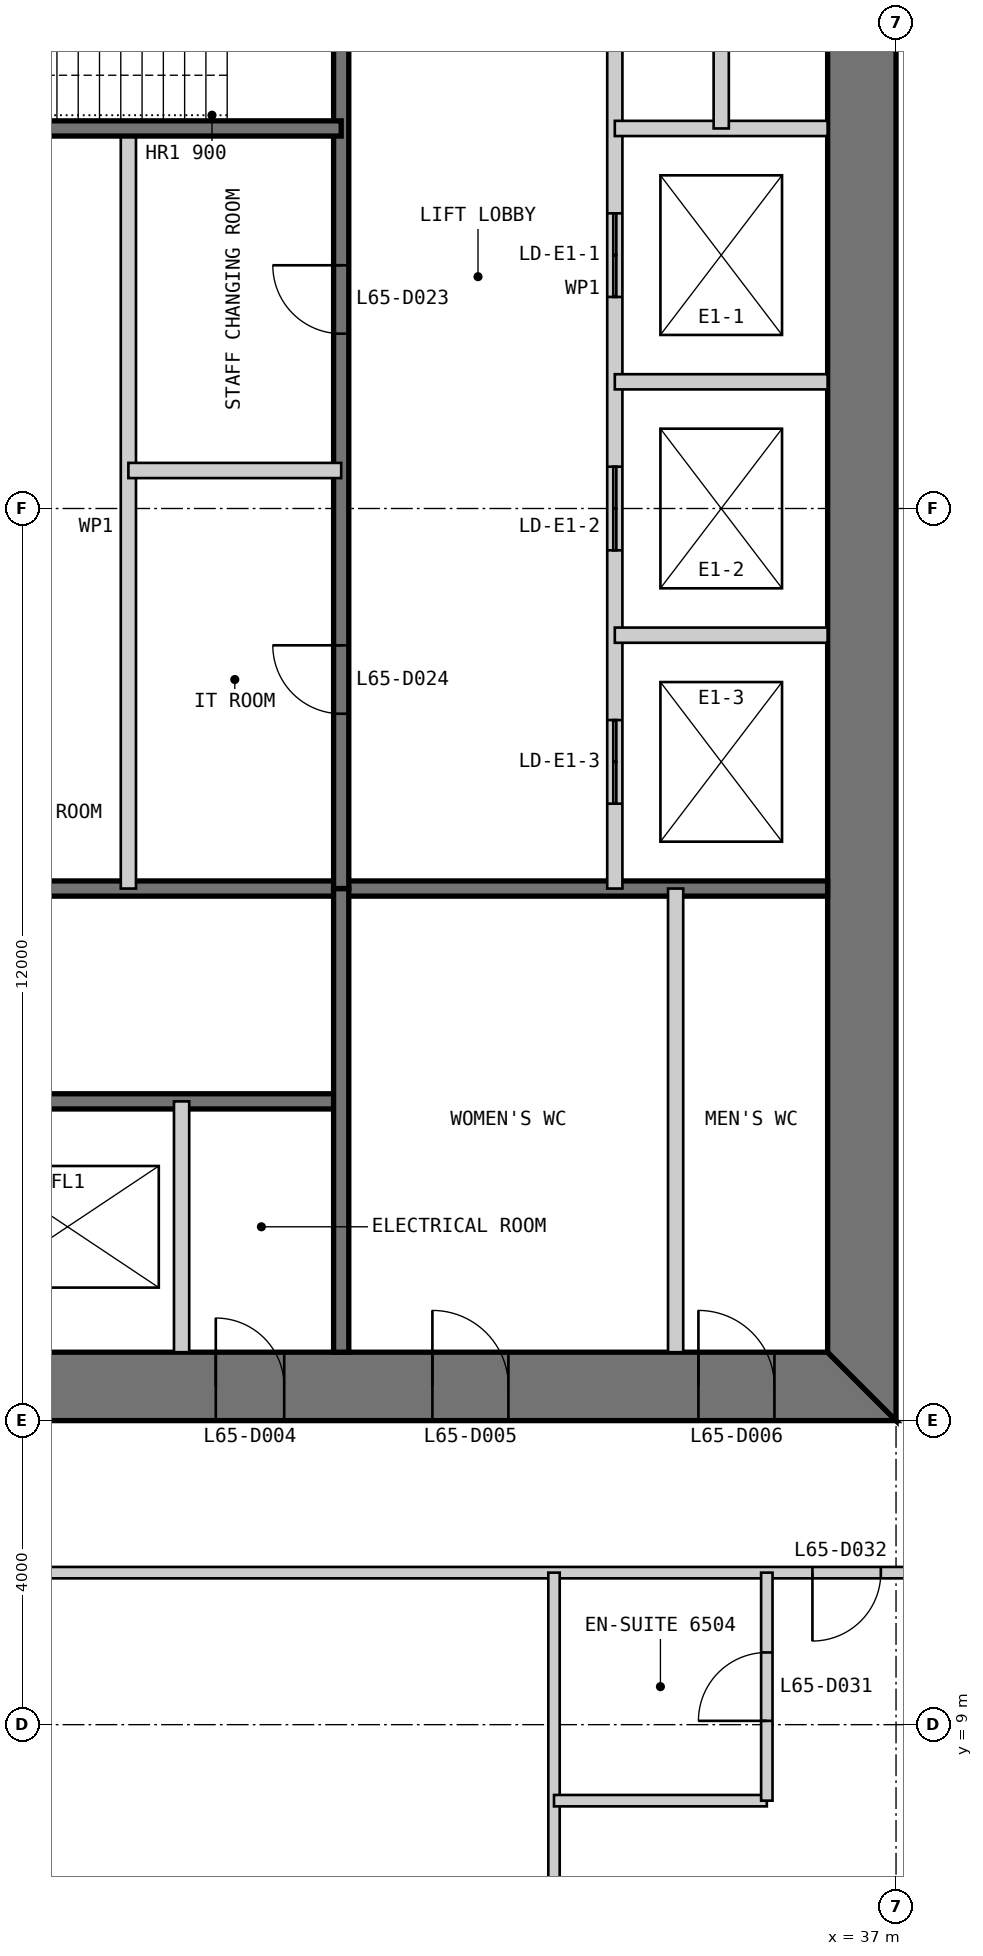
"""IFC4 building model, lengths in metres.
Left out: names, types, materials, properties, quantities, classifications, styles, units other than length and angle.
Written with IfcOpenShell. Run it as: python <this file> out.ifc"""

import sys

from ifc_helpers import new_model, si_unit, direction, frame, frame_2d, origin, place, context, subcontext, project, spatial, polyline, rectangle, outline, extrude, element, fill, save


model = new_model("IFC4")
c1 = context("Model", 3, precision=1e-05, world=origin(), true_north=direction((0.0, 1.0)))
c2 = subcontext(c1, "Body", "Model", "MODEL_VIEW")
j1 = project(units=[si_unit("LENGTHUNIT", "METRE"), si_unit("PLANEANGLEUNIT", "RADIAN")], contexts=[c1])
p1 = place(None, origin())
s1 = spatial("IfcSite", under=j1, at=p1, CompositionType="ELEMENT")
p2 = place(p1, origin())
s2 = spatial("IfcBuilding", under=s1, at=p2, CompositionType="ELEMENT")
p3 = place(p2, frame((0.0, 0.0, 273.0)))
s3 = spatial("IfcBuildingStorey", under=s2, at=p3, CompositionType="ELEMENT", Elevation=273.0)
p4 = place(p3, frame((13.0, 13.45, 0.0), z_axis=(0.0, 0.0, 1.0), x_axis=(1.0, 0.0, 0.0)))
e1 = element("IfcWall", 1, at=p4, inside=s3, PredefinedType="SHEAR", context=c2, shape_type="SweptSolid", body=[
    extrude(outline(polyline([(0.0, -0.45), (24.0, -0.45), (23.1, 0.45), (0.9, 0.45), (0.0, -0.45)])), origin(), (0.0, 0.0, 1.0), 3.4),
])
p5 = place(p4, frame((4.9, 0.0, 0.0)))
e2 = element("IfcOpeningElement", 2, at=p5, cuts=e1, PredefinedType="OPENING", context=c2, shape_type="SweptSolid", body=[
    extrude(rectangle(XDim=1.0, YDim=2.2, at=frame_2d((0.5, 1.1))), frame((0.0, 0.46, 0.0), z_axis=(0.0, -1.0, 0.0), x_axis=(1.0, 0.0, 0.0)), (0.0, 0.0, 1.0), 0.92),
])
p6 = place(p4, frame((8.9, 0.0, 0.0)))
e3 = element("IfcOpeningElement", 3, at=p6, cuts=e1, PredefinedType="OPENING", context=c2, shape_type="SweptSolid", body=[
    extrude(rectangle(XDim=1.1, YDim=2.2, at=frame_2d((0.55, 1.1))), frame((0.0, 0.46, 0.0), z_axis=(0.0, -1.0, 0.0), x_axis=(1.0, 0.0, 0.0)), (0.0, 0.0, 1.0), 0.92),
])
p7 = place(p4, frame((15.05, 0.0, 0.0)))
e4 = element("IfcOpeningElement", 4, at=p7, cuts=e1, PredefinedType="OPENING", context=c2, shape_type="SweptSolid", body=[
    extrude(rectangle(XDim=0.9, YDim=2.2, at=frame_2d((0.45, 1.1))), frame((0.0, 0.46, 0.0), z_axis=(0.0, -1.0, 0.0), x_axis=(1.0, 0.0, 0.0)), (0.0, 0.0, 1.0), 0.92),
])
p8 = place(p4, frame((17.9, 0.0, 0.0)))
e5 = element("IfcOpeningElement", 5, at=p8, cuts=e1, PredefinedType="OPENING", context=c2, shape_type="SweptSolid", body=[
    extrude(rectangle(XDim=1.0, YDim=2.2, at=frame_2d((0.5, 1.1))), frame((0.0, 0.46, 0.0), z_axis=(0.0, -1.0, 0.0), x_axis=(1.0, 0.0, 0.0)), (0.0, 0.0, 1.0), 0.92),
])
p9 = place(p4, frame((21.4, 0.0, 0.0)))
e6 = element("IfcOpeningElement", 6, at=p9, cuts=e1, PredefinedType="OPENING", context=c2, shape_type="SweptSolid", body=[
    extrude(rectangle(XDim=1.0, YDim=2.2, at=frame_2d((0.5, 1.1))), frame((0.0, 0.46, 0.0), z_axis=(0.0, -1.0, 0.0), x_axis=(1.0, 0.0, 0.0)), (0.0, 0.0, 1.0), 0.92),
])
p10 = place(p3, frame((36.55, 13.9, 0.0), z_axis=(0.0, 0.0, 1.0), x_axis=(0.0, 1.0, 0.0)))
e7 = element("IfcWall", 7, at=p10, inside=s3, PredefinedType="SHEAR", context=c2, shape_type="SweptSolid", body=[
    extrude(outline(polyline([(-0.9, -0.45), (23.1, -0.45), (22.2, 0.45), (0.0, 0.45), (-0.9, -0.45)])), origin(), (0.0, 0.0, 1.0), 3.4),
])
p11 = place(p10, frame((20.2, 0.0, 0.0)))
e8 = element("IfcOpeningElement", 8, at=p11, cuts=e7, PredefinedType="OPENING", context=c2, shape_type="SweptSolid", body=[
    extrude(rectangle(XDim=1.0, YDim=2.2, at=frame_2d((0.5, 1.1))), frame((0.0, 0.46, 0.0), z_axis=(0.0, -1.0, 0.0), x_axis=(1.0, 0.0, 0.0)), (0.0, 0.0, 1.0), 0.92),
])
p12 = place(p10, frame((17.25, 0.0, 0.0)))
e9 = element("IfcOpeningElement", 9, at=p12, cuts=e7, PredefinedType="OPENING", context=c2, shape_type="SweptSolid", body=[
    extrude(rectangle(XDim=0.9, YDim=2.2, at=frame_2d((0.45, 1.1))), frame((0.0, 0.46, 0.0), z_axis=(0.0, -1.0, 0.0), x_axis=(1.0, 0.0, 0.0)), (0.0, 0.0, 1.0), 0.92),
])
p13 = place(p3, frame((20.3, 17.2, 0.0), z_axis=(0.0, 0.0, 1.0), x_axis=(1.0, 0.0, 0.0)))
e10 = element("IfcWall", 10, at=p13, inside=s3, PredefinedType="SOLIDWALL", context=c2, shape_type="SweptSolid", body=[
    extrude(rectangle(XDim=9.4, YDim=0.2, at=frame_2d((4.7, 0.0))), origin(), (0.0, 0.0, 1.0), 3.2),
])
p14 = place(p13, frame((0.25, 0.0, 0.0)))
e11 = element("IfcOpeningElement", 11, at=p14, cuts=e10, PredefinedType="OPENING", context=c2, shape_type="SweptSolid", body=[
    extrude(rectangle(XDim=1.0, YDim=2.2, at=frame_2d((0.5, 1.1))), frame((0.0, 0.11, 0.0), z_axis=(0.0, -1.0, 0.0), x_axis=(1.0, 0.0, 0.0)), (0.0, 0.0, 1.0), 0.22),
])
p15 = place(p3, frame((20.3, 20.0, 0.0), z_axis=(0.0, 0.0, 1.0), x_axis=(1.0, 0.0, 0.0)))
e12 = element("IfcWall", 12, at=p15, inside=s3, PredefinedType="SOLIDWALL", context=c2, shape_type="SweptSolid", body=[
    extrude(rectangle(XDim=15.8, YDim=0.2, at=frame_2d((7.9, 0.0))), origin(), (0.0, 0.0, 1.0), 3.2),
])
p16 = place(p3, frame((27.6, 13.9, 0.0), z_axis=(0.0, 0.0, 1.0), x_axis=(0.0, 1.0, 0.0)))
e13 = element("IfcWall", 13, at=p16, inside=s3, PredefinedType="PARTITIONING", context=c2, shape_type="SweptSolid", body=[
    extrude(rectangle(XDim=3.3, YDim=0.2, at=frame_2d((1.65, 0.0))), origin(), (0.0, 0.0, 1.0), 3.2),
])
p17 = place(p3, frame((29.7, 13.9, 0.0), z_axis=(0.0, 0.0, 1.0), x_axis=(0.0, 1.0, 0.0)))
e14 = element("IfcWall", 14, at=p17, inside=s3, PredefinedType="SOLIDWALL", context=c2, shape_type="SweptSolid", body=[
    extrude(rectangle(XDim=6.1, YDim=0.2, at=frame_2d((3.05, 0.0))), origin(), (0.0, 0.0, 1.0), 3.2),
])
p18 = place(p3, frame((34.1, 13.9, 0.0), z_axis=(0.0, 0.0, 1.0), x_axis=(0.0, 1.0, 0.0)))
e15 = element("IfcWall", 15, at=p18, inside=s3, PredefinedType="PARTITIONING", context=c2, shape_type="SweptSolid", body=[
    extrude(rectangle(XDim=6.1, YDim=0.2, at=frame_2d((3.05, 0.0))), origin(), (0.0, 0.0, 1.0), 3.2),
])
p19 = place(p3, frame((33.3, 36.1, 0.0), z_axis=(0.0, 0.0, 1.0), x_axis=(0.0, -1.0, 0.0)))
e16 = element("IfcWall", 16, at=p19, inside=s3, PredefinedType="PARTITIONING", context=c2, shape_type="SweptSolid", body=[
    extrude(rectangle(XDim=16.1, YDim=0.2, at=frame_2d((8.05, 0.0))), origin(), (0.0, 0.0, 1.0), 3.2),
])
p20 = place(p19, frame((3.8, 0.0, 0.0)))
e17 = element("IfcOpeningElement", 17, at=p20, cuts=e16, PredefinedType="OPENING", context=c2, shape_type="SweptSolid", body=[
    extrude(rectangle(XDim=0.9, YDim=2.2, at=frame_2d((0.45, 1.1))), frame((0.0, 0.11, 0.0), z_axis=(0.0, -1.0, 0.0), x_axis=(1.0, 0.0, 0.0)), (0.0, 0.0, 1.0), 0.22),
])
p21 = place(p19, frame((7.217, 0.0, 0.0)))
e18 = element("IfcOpeningElement", 18, at=p21, cuts=e16, PredefinedType="OPENING", context=c2, shape_type="SweptSolid", body=[
    extrude(rectangle(XDim=1.1, YDim=2.2, at=frame_2d((0.55, 1.1))), frame((0.0, 0.11, 0.0), z_axis=(0.0, -1.0, 0.0), x_axis=(1.0, 0.0, 0.0)), (0.0, 0.0, 1.0), 0.22),
])
p22 = place(p19, frame((10.55, 0.0, 0.0)))
e19 = element("IfcOpeningElement", 19, at=p22, cuts=e16, PredefinedType="OPENING", context=c2, shape_type="SweptSolid", body=[
    extrude(rectangle(XDim=1.1, YDim=2.2, at=frame_2d((0.55, 1.1))), frame((0.0, 0.11, 0.0), z_axis=(0.0, -1.0, 0.0), x_axis=(1.0, 0.0, 0.0)), (0.0, 0.0, 1.0), 0.22),
])
p23 = place(p19, frame((13.883, 0.0, 0.0)))
e20 = element("IfcOpeningElement", 20, at=p23, cuts=e16, PredefinedType="OPENING", context=c2, shape_type="SweptSolid", body=[
    extrude(rectangle(XDim=1.1, YDim=2.2, at=frame_2d((0.55, 1.1))), frame((0.0, 0.11, 0.0), z_axis=(0.0, -1.0, 0.0), x_axis=(1.0, 0.0, 0.0)), (0.0, 0.0, 1.0), 0.22),
])
p24 = place(p3, frame((29.7, 36.1, 0.0), z_axis=(0.0, 0.0, 1.0), x_axis=(0.0, -1.0, 0.0)))
e21 = element("IfcWall", 21, at=p24, inside=s3, PredefinedType="SOLIDWALL", context=c2, shape_type="SweptSolid", body=[
    extrude(rectangle(XDim=16.1, YDim=0.2, at=frame_2d((8.05, 0.0))), origin(), (0.0, 0.0, 1.0), 3.2),
])
p25 = place(p24, frame((7.9, 0.0, 0.0)))
e22 = element("IfcOpeningElement", 22, at=p25, cuts=e21, PredefinedType="OPENING", context=c2, shape_type="SweptSolid", body=[
    extrude(rectangle(XDim=0.9, YDim=2.2, at=frame_2d((0.45, 1.1))), frame((0.0, 0.11, 0.0), z_axis=(0.0, -1.0, 0.0), x_axis=(1.0, 0.0, 0.0)), (0.0, 0.0, 1.0), 0.22),
])
p26 = place(p24, frame((12.9, 0.0, 0.0)))
e23 = element("IfcOpeningElement", 23, at=p26, cuts=e21, PredefinedType="OPENING", context=c2, shape_type="SweptSolid", body=[
    extrude(rectangle(XDim=0.9, YDim=2.2, at=frame_2d((0.45, 1.1))), frame((0.0, 0.11, 0.0), z_axis=(0.0, -1.0, 0.0), x_axis=(1.0, 0.0, 0.0)), (0.0, 0.0, 1.0), 0.22),
])
for number, where, z_axis, x_axis in (
    (24, (36.1, 30.0, 0.0), (0.0, 0.0, 1.0), (-1.0, 0.0, 0.0)),
    (25, (36.1, 26.667, 0.0), (0.0, 0.0, 1.0), (-1.0, 0.0, 0.0)),
    (26, (36.1, 23.333, 0.0), (0.0, 0.0, 1.0), (-1.0, 0.0, 0.0)),
):
    element("IfcWall", number, at=place(p3, frame(where, z_axis=z_axis, x_axis=x_axis)), inside=s3, PredefinedType="PARTITIONING", context=c2, shape_type="SweptSolid", body=[
        extrude(rectangle(XDim=2.8, YDim=0.2, at=frame_2d((1.4, 0.0))), origin(), (0.0, 0.0, 1.0), 3.2),
    ])
p27 = place(p3, frame((26.9, 30.0, 0.0), z_axis=(0.0, 0.0, 1.0), x_axis=(0.0, -1.0, 0.0)))
e27 = element("IfcWall", 27, at=p27, inside=s3, PredefinedType="PARTITIONING", context=c2, shape_type="SweptSolid", body=[
    extrude(rectangle(XDim=10.0, YDim=0.2, at=frame_2d((5.0, 0.0))), origin(), (0.0, 0.0, 1.0), 3.2),
])
p28 = place(p3, frame((29.7, 30.0, 0.0), z_axis=(0.0, 0.0, 1.0), x_axis=(-1.0, 0.0, 0.0)))
e28 = element("IfcWall", 28, at=p28, inside=s3, PredefinedType="SOLIDWALL", context=c2, shape_type="SweptSolid", body=[
    extrude(rectangle(XDim=15.8, YDim=0.2, at=frame_2d((7.9, 0.0))), origin(), (0.0, 0.0, 1.0), 3.2),
])
p29 = place(p3, frame((34.7, 33.7, 0.0), z_axis=(0.0, 0.0, 1.0), x_axis=(0.0, -1.0, 0.0)))
e29 = element("IfcWall", 29, at=p29, inside=s3, PredefinedType="PARTITIONING", context=c2, shape_type="SweptSolid", body=[
    extrude(rectangle(XDim=3.7, YDim=0.2, at=frame_2d((1.85, 0.0))), origin(), (0.0, 0.0, 1.0), 3.2),
])
p30 = place(p3, frame((29.7, 25.5, 0.0), z_axis=(0.0, 0.0, 1.0), x_axis=(-1.0, 0.0, 0.0)))
e30 = element("IfcWall", 30, at=p30, inside=s3, PredefinedType="PARTITIONING", context=c2, shape_type="SweptSolid", body=[
    extrude(rectangle(XDim=2.8, YDim=0.2, at=frame_2d((1.4, 0.0))), origin(), (0.0, 0.0, 1.0), 3.2),
])
p31 = place(p3, frame((11.0, 11.0, 0.0), z_axis=(0.0, 0.0, 1.0), x_axis=(1.0, 0.0, 0.0)))
e31 = element("IfcWall", 31, at=p31, inside=s3, PredefinedType="PARTITIONING", context=c2, shape_type="SweptSolid", body=[
    extrude(rectangle(XDim=28.0, YDim=0.15, at=frame_2d((14.0, 0.0))), origin(), (0.0, 0.0, 1.0), 2.844),
])
p32 = place(p31, frame((1.9, 0.0, 0.0)))
e32 = element("IfcOpeningElement", 32, at=p32, cuts=e31, PredefinedType="OPENING", context=c2, shape_type="SweptSolid", body=[
    extrude(rectangle(XDim=0.9, YDim=2.1, at=frame_2d((0.45, 1.05))), frame((0.0, 0.085, 0.0), z_axis=(0.0, -1.0, 0.0), x_axis=(1.0, 0.0, 0.0)), (0.0, 0.0, 1.0), 0.17),
])
p33 = place(p31, frame((4.7, 0.0, 0.0)))
e33 = element("IfcOpeningElement", 33, at=p33, cuts=e31, PredefinedType="OPENING", context=c2, shape_type="SweptSolid", body=[
    extrude(rectangle(XDim=1.0, YDim=2.1, at=frame_2d((0.5, 1.05))), frame((0.0, 0.085, 0.0), z_axis=(0.0, -1.0, 0.0), x_axis=(1.0, 0.0, 0.0)), (0.0, 0.0, 1.0), 0.17),
])
p34 = place(p31, frame((13.3, 0.0, 0.0)))
e34 = element("IfcOpeningElement", 34, at=p34, cuts=e31, PredefinedType="OPENING", context=c2, shape_type="SweptSolid", body=[
    extrude(rectangle(XDim=0.9, YDim=2.1, at=frame_2d((0.45, 1.05))), frame((0.0, 0.085, 0.0), z_axis=(0.0, -1.0, 0.0), x_axis=(1.0, 0.0, 0.0)), (0.0, 0.0, 1.0), 0.17),
])
p35 = place(p31, frame((24.9, 0.0, 0.0)))
e35 = element("IfcOpeningElement", 35, at=p35, cuts=e31, PredefinedType="OPENING", context=c2, shape_type="SweptSolid", body=[
    extrude(rectangle(XDim=0.9, YDim=2.1, at=frame_2d((0.45, 1.05))), frame((0.0, 0.085, 0.0), z_axis=(0.0, -1.0, 0.0), x_axis=(1.0, 0.0, 0.0)), (0.0, 0.0, 1.0), 0.17),
])
p36 = place(p3, frame((32.5, 0.15, 0.0), z_axis=(0.0, 0.0, 1.0), x_axis=(0.0, 1.0, 0.0)))
e36 = element("IfcWall", 36, at=p36, inside=s3, PredefinedType="PARTITIONING", context=c2, shape_type="SweptSolid", body=[
    extrude(rectangle(XDim=10.85, YDim=0.15, at=frame_2d((5.425, 0.0))), origin(), (0.0, 0.0, 1.0), 3.25),
])
p37 = place(p3, frame((32.5, 8.0, 0.0), z_axis=(0.0, 0.0, 1.0), x_axis=(1.0, 0.0, 0.0)))
e37 = element("IfcWall", 37, at=p37, inside=s3, PredefinedType="PARTITIONING", context=c2, shape_type="SweptSolid", body=[
    extrude(rectangle(XDim=2.8, YDim=0.15, at=frame_2d((1.4, 0.0))), origin(), (0.0, 0.0, 1.0), 3.25),
])
p38 = place(p3, frame((35.3, 8.0, 0.0), z_axis=(0.0, 0.0, 1.0), x_axis=(0.0, 1.0, 0.0)))
e38 = element("IfcWall", 38, at=p38, inside=s3, PredefinedType="PARTITIONING", context=c2, shape_type="SweptSolid", body=[
    extrude(rectangle(XDim=3.0, YDim=0.15, at=frame_2d((1.5, 0.0))), origin(), (0.0, 0.0, 1.0), 3.25),
])
p39 = place(p38, frame((1.05, 0.0, 0.0)))
e39 = element("IfcOpeningElement", 39, at=p39, cuts=e38, PredefinedType="OPENING", context=c2, shape_type="SweptSolid", body=[
    extrude(rectangle(XDim=0.9, YDim=2.1, at=frame_2d((0.45, 1.05))), frame((0.0, 0.085, 0.0), z_axis=(0.0, -1.0, 0.0), x_axis=(1.0, 0.0, 0.0)), (0.0, 0.0, 1.0), 0.17),
])
p40 = place(p7, origin())
e40 = element("IfcDoor", 40, at=p40, inside=s3, OperationType="SINGLE_SWING_LEFT", PredefinedType="DOOR", context=c2, shape_type="SweptSolid", body=[
    extrude(rectangle(XDim=0.9, YDim=2.2, at=frame_2d((0.45, 1.1))), frame((0.0, 0.025, 0.0), z_axis=(0.0, -1.0, 0.0), x_axis=(1.0, 0.0, 0.0)), (0.0, 0.0, 1.0), 0.05),
    extrude(outline(polyline([(0.0, 0.0), (0.04, 0.0), (0.04, 2.16), (0.86, 2.16), (0.86, 0.0), (0.9, 0.0), (0.9, 2.2), (0.0, 2.2), (0.0, 0.0)])), frame((0.0, 0.3, 0.0), z_axis=(0.0, -1.0, 0.0), x_axis=(1.0, 0.0, 0.0)), (0.0, 0.0, 1.0), 0.6),
])
fill(e4, e40)
p41 = place(p8, origin())
e41 = element("IfcDoor", 41, at=p41, inside=s3, OperationType="SINGLE_SWING_LEFT", PredefinedType="DOOR", context=c2, shape_type="SweptSolid", body=[
    extrude(rectangle(XDim=1.0, YDim=2.2, at=frame_2d((0.5, 1.1))), frame((0.0, 0.025, 0.0), z_axis=(0.0, -1.0, 0.0), x_axis=(1.0, 0.0, 0.0)), (0.0, 0.0, 1.0), 0.05),
    extrude(outline(polyline([(0.0, 0.0), (0.04, 0.0), (0.04, 2.16), (0.96, 2.16), (0.96, 0.0), (1.0, 0.0), (1.0, 2.2), (0.0, 2.2), (0.0, 0.0)])), frame((0.0, 0.3, 0.0), z_axis=(0.0, -1.0, 0.0), x_axis=(1.0, 0.0, 0.0)), (0.0, 0.0, 1.0), 0.6),
])
fill(e5, e41)
p42 = place(p9, origin())
e42 = element("IfcDoor", 42, at=p42, inside=s3, OperationType="SINGLE_SWING_LEFT", PredefinedType="DOOR", context=c2, shape_type="SweptSolid", body=[
    extrude(rectangle(XDim=1.0, YDim=2.2, at=frame_2d((0.5, 1.1))), frame((0.0, 0.025, 0.0), z_axis=(0.0, -1.0, 0.0), x_axis=(1.0, 0.0, 0.0)), (0.0, 0.0, 1.0), 0.05),
    extrude(outline(polyline([(0.0, 0.0), (0.04, 0.0), (0.04, 2.16), (0.96, 2.16), (0.96, 0.0), (1.0, 0.0), (1.0, 2.2), (0.0, 2.2), (0.0, 0.0)])), frame((0.0, 0.3, 0.0), z_axis=(0.0, -1.0, 0.0), x_axis=(1.0, 0.0, 0.0)), (0.0, 0.0, 1.0), 0.6),
])
fill(e6, e42)
p43 = place(p25, frame((0.9, 0.0, 0.0), z_axis=(0.0, 0.0, 1.0), x_axis=(-1.0, 0.0, 0.0)))
e43 = element("IfcDoor", 43, at=p43, inside=s3, OperationType="SINGLE_SWING_RIGHT", PredefinedType="DOOR", context=c2, shape_type="SweptSolid", body=[
    extrude(rectangle(XDim=0.9, YDim=2.2, at=frame_2d((0.45, 1.1))), frame((0.0, 0.025, 0.0), z_axis=(0.0, -1.0, 0.0), x_axis=(1.0, 0.0, 0.0)), (0.0, 0.0, 1.0), 0.05),
])
fill(e22, e43)
p44 = place(p26, frame((0.9, 0.0, 0.0), z_axis=(0.0, 0.0, 1.0), x_axis=(-1.0, 0.0, 0.0)))
e44 = element("IfcDoor", 44, at=p44, inside=s3, OperationType="SINGLE_SWING_RIGHT", PredefinedType="DOOR", context=c2, shape_type="SweptSolid", body=[
    extrude(rectangle(XDim=0.9, YDim=2.2, at=frame_2d((0.45, 1.1))), frame((0.0, 0.025, 0.0), z_axis=(0.0, -1.0, 0.0), x_axis=(1.0, 0.0, 0.0)), (0.0, 0.0, 1.0), 0.05),
])
fill(e23, e44)
p45 = place(p39, origin())
e45 = element("IfcDoor", 45, at=p45, inside=s3, OperationType="SINGLE_SWING_LEFT", PredefinedType="DOOR", context=c2, shape_type="SweptSolid", body=[
    extrude(rectangle(XDim=0.9, YDim=2.1, at=frame_2d((0.45, 1.05))), frame((0.0, 0.025, 0.0), z_axis=(0.0, -1.0, 0.0), x_axis=(1.0, 0.0, 0.0)), (0.0, 0.0, 1.0), 0.05),
])
fill(e39, e45)
p46 = place(p35, frame((0.9, 0.0, 0.0), z_axis=(0.0, 0.0, 1.0), x_axis=(-1.0, 0.0, 0.0)))
e46 = element("IfcDoor", 46, at=p46, inside=s3, OperationType="SINGLE_SWING_RIGHT", PredefinedType="DOOR", context=c2, shape_type="SweptSolid", body=[
    extrude(rectangle(XDim=0.9, YDim=2.1, at=frame_2d((0.45, 1.05))), frame((0.0, 0.025, 0.0), z_axis=(0.0, -1.0, 0.0), x_axis=(1.0, 0.0, 0.0)), (0.0, 0.0, 1.0), 0.05),
])
fill(e35, e46)
p47 = place(p21, origin())
e47 = element("IfcDoor", 47, at=p47, inside=s3, OperationType="DOUBLE_DOOR_SLIDING", PredefinedType="DOOR", context=c2, shape_type="SweptSolid", body=[
    extrude(rectangle(XDim=1.1, YDim=2.2, at=frame_2d((0.55, 1.1))), frame((0.0, 0.025, 0.0), z_axis=(0.0, -1.0, 0.0), x_axis=(1.0, 0.0, 0.0)), (0.0, 0.0, 1.0), 0.05),
])
fill(e18, e47)
p48 = place(p22, origin())
e48 = element("IfcDoor", 48, at=p48, inside=s3, OperationType="DOUBLE_DOOR_SLIDING", PredefinedType="DOOR", context=c2, shape_type="SweptSolid", body=[
    extrude(rectangle(XDim=1.1, YDim=2.2, at=frame_2d((0.55, 1.1))), frame((0.0, 0.025, 0.0), z_axis=(0.0, -1.0, 0.0), x_axis=(1.0, 0.0, 0.0)), (0.0, 0.0, 1.0), 0.05),
])
fill(e19, e48)
p49 = place(p23, origin())
e49 = element("IfcDoor", 49, at=p49, inside=s3, OperationType="DOUBLE_DOOR_SLIDING", PredefinedType="DOOR", context=c2, shape_type="SweptSolid", body=[
    extrude(rectangle(XDim=1.1, YDim=2.2, at=frame_2d((0.55, 1.1))), frame((0.0, 0.025, 0.0), z_axis=(0.0, -1.0, 0.0), x_axis=(1.0, 0.0, 0.0)), (0.0, 0.0, 1.0), 0.05),
])
fill(e20, e49)
save(model, sys.argv[1])
